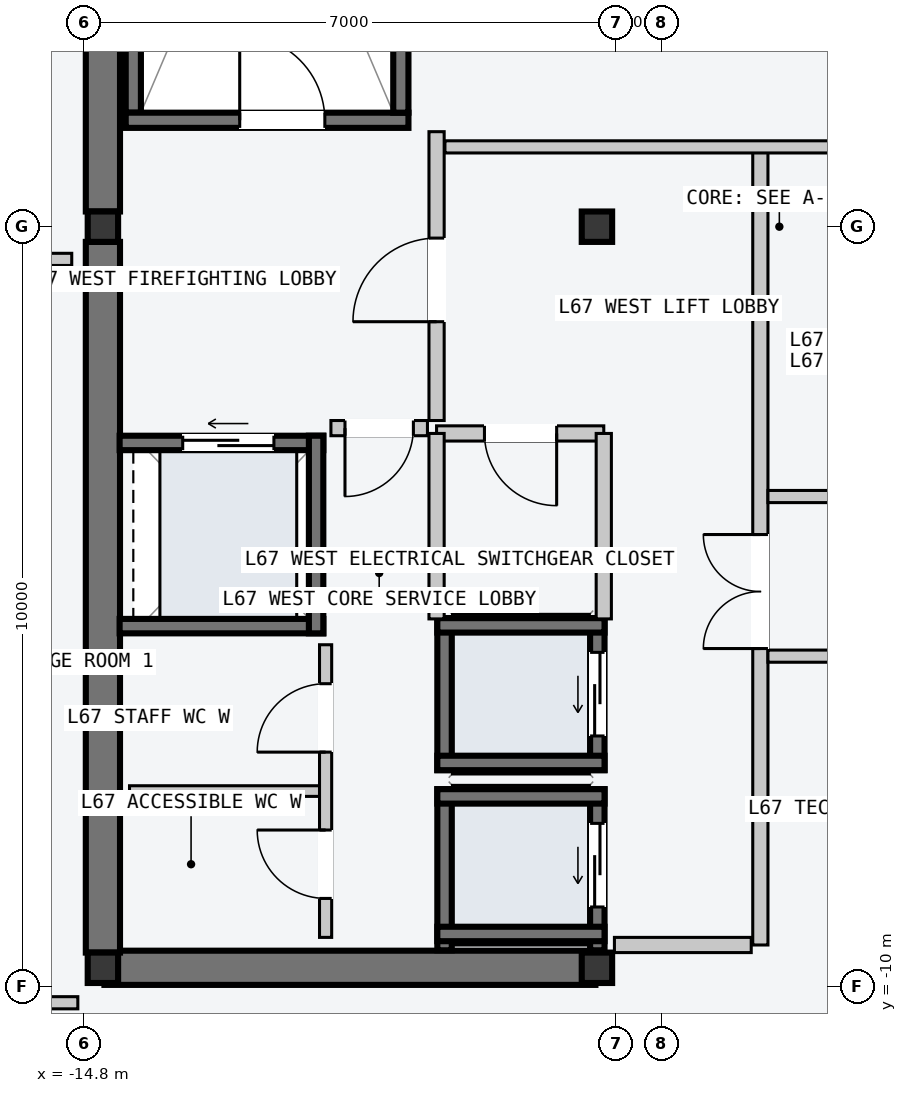
"""IFC4 building model, lengths in metres.
Left out: names, types, materials, properties, quantities, classifications, styles, units other than length and angle.
Written with IfcOpenShell. Run it as: python <this file> out.ifc"""

import sys

from ifc_helpers import new_model, si_unit, direction, frame, frame_2d, origin, origin_2d, place, context, subcontext, project, spatial, rectangle, i_section, extrude, element, fill, save


model = new_model("IFC4")
c1 = context("Model", 3, precision=1e-05, world=origin(), true_north=direction((0.0, 1.0)))
c2 = subcontext(c1, "Body", "Model", "MODEL_VIEW")
j1 = project(units=[si_unit("LENGTHUNIT", "METRE"), si_unit("PLANEANGLEUNIT", "RADIAN")], contexts=[c1])
p1 = place(None, origin())
s1 = spatial("IfcSite", under=j1, at=p1, CompositionType="ELEMENT")
p2 = place(p1, origin())
s2 = spatial("IfcBuilding", under=s1, at=p2, CompositionType="ELEMENT")
p3 = place(p2, frame((0.0, 0.0, 254.4)))
s3 = spatial("IfcBuildingStorey", under=s2, at=p3, CompositionType="ELEMENT", Elevation=254.4)
p4 = place(p3, frame((-14.53, -9.75, -0.2), z_axis=(0.0, 0.0, 1.0), x_axis=(1.0, 0.0, 0.0)))
e1 = element("IfcWall", 1, at=p4, inside=s3, PredefinedType="SHEAR", context=c2, shape_type="SweptSolid", body=[
    extrude(rectangle(XDim=6.46, YDim=0.45, at=frame_2d((3.23, 0.0))), origin(), (0.0, 0.0, 1.0), 3.6),
])
for number, where, z_axis, x_axis in (
    (2, (-14.55, -9.55, -0.2), (0.0, 0.0, 1.0), (0.0, 1.0, 0.0)),
    (3, (-14.55, 0.2, -0.2), (0.0, 0.0, 1.0), (0.0, 1.0, 0.0)),
):
    element("IfcWall", number, at=place(p3, frame(where, z_axis=z_axis, x_axis=x_axis)), inside=s3, PredefinedType="SHEAR", context=c2, shape_type="SweptSolid", body=[
        extrude(rectangle(XDim=9.35, YDim=0.45, at=frame_2d((4.675, 0.0))), origin(), (0.0, 0.0, 1.0), 3.6),
    ])
p5 = place(p3, frame((-14.15, 1.5, -0.2), z_axis=(0.0, 0.0, 1.0), x_axis=(0.0, 1.0, 0.0)))
e4 = element("IfcWall", 4, at=p5, inside=s3, PredefinedType="SOLIDWALL", context=c2, shape_type="SweptSolid", body=[
    extrude(rectangle(XDim=7.8, YDim=0.2, at=frame_2d((3.9, 0.0))), origin(), (0.0, 0.0, 1.0), 3.6),
])
p6 = place(p3, frame((-14.25, 1.4, -0.2), z_axis=(0.0, 0.0, 1.0), x_axis=(1.0, 0.0, 0.0)))
e5 = element("IfcWall", 5, at=p6, inside=s3, PredefinedType="SOLIDWALL", context=c2, shape_type="SweptSolid", body=[
    extrude(rectangle(XDim=3.72, YDim=0.2, at=frame_2d((1.86, 0.0))), origin(), (0.0, 0.0, 1.0), 3.6),
])
p7 = place(p6, frame((1.5, 0.0, 0.2)))
e6 = element("IfcOpeningElement", 6, at=p7, cuts=e5, PredefinedType="OPENING", context=c2, shape_type="SweptSolid", body=[
    extrude(rectangle(XDim=1.12, YDim=2.18, at=frame_2d((0.56, 1.09))), frame((0.0, 0.11, 0.0), z_axis=(0.0, -1.0, 0.0), x_axis=(1.0, 0.0, 0.0)), (0.0, 0.0, 1.0), 0.22),
])
p8 = place(p3, frame((-10.63, 1.5, -0.2), z_axis=(0.0, 0.0, 1.0), x_axis=(0.0, 1.0, 0.0)))
e7 = element("IfcWall", 7, at=p8, inside=s3, PredefinedType="SOLIDWALL", context=c2, shape_type="SweptSolid", body=[
    extrude(rectangle(XDim=7.8, YDim=0.2, at=frame_2d((3.9, 0.0))), origin(), (0.0, 0.0, 1.0), 3.6),
])
for number, where, z_axis, x_axis in (
    (8, (-14.55, -9.75, 0.0), (0.0, 0.0, 1.0), (1.0, 0.0, 0.0)),
    (9, (-14.55, 0.0, 0.0), (0.0, 0.0, 1.0), (1.0, 0.0, 0.0)),
    (10, (-8.05, -9.75, 0.0), (0.0, 0.0, 1.0), (1.0, 0.0, 0.0)),
    (11, (-8.05, 0.0, 0.0), (0.0, 0.0, 1.0), (1.0, 0.0, 0.0)),
):
    element("IfcColumn", number, at=place(p3, frame(where, z_axis=z_axis, x_axis=x_axis)), inside=s3, PredefinedType="COLUMN", context=c2, shape_type="SweptSolid", body=[
        extrude(i_section(OverallWidth=0.4, OverallDepth=0.4, WebThickness=0.013, FlangeThickness=0.021, at=origin_2d()), origin(), (0.0, 0.0, 1.0), 3.6),
    ])
p9 = place(p3, frame((-8.045, -9.52, -0.2), z_axis=(0.0, 0.0, 1.0), x_axis=(0.0, 1.0, 0.0)))
e12 = element("IfcWall", 12, at=p9, inside=s3, PredefinedType="SOLIDWALL", context=c2, shape_type="SweptSolid", body=[
    extrude(rectangle(XDim=2.12, YDim=0.19, at=frame_2d((1.06, 0.0))), origin(), (0.0, 0.0, 1.0), 3.6),
])
p10 = place(p9, frame((0.57, 0.0, 0.2)))
e13 = element("IfcOpeningElement", 13, at=p10, cuts=e12, PredefinedType="OPENING", context=c2, shape_type="SweptSolid", body=[
    extrude(rectangle(XDim=1.1, YDim=2.2, at=frame_2d((0.55, 1.1))), frame((0.0, 0.105, 0.0), z_axis=(0.0, -1.0, 0.0), x_axis=(1.0, 0.0, 0.0)), (0.0, 0.0, 1.0), 0.21),
])
p11 = place(p3, frame((-10.055, -9.52, -0.2), z_axis=(0.0, 0.0, 1.0), x_axis=(0.0, 1.0, 0.0)))
e14 = element("IfcWall", 14, at=p11, inside=s3, PredefinedType="SOLIDWALL", context=c2, shape_type="SweptSolid", body=[
    extrude(rectangle(XDim=2.12, YDim=0.19, at=frame_2d((1.06, 0.0))), origin(), (0.0, 0.0, 1.0), 3.6),
])
for number, where, z_axis, x_axis in (
    (15, (-10.15, -7.495, -0.2), (0.0, 0.0, 1.0), (1.0, 0.0, 0.0)),
    (16, (-10.15, -9.305, -0.2), (0.0, 0.0, 1.0), (1.0, 0.0, 0.0)),
):
    element("IfcWall", number, at=place(p3, frame(where, z_axis=z_axis, x_axis=x_axis)), inside=s3, PredefinedType="SOLIDWALL", context=c2, shape_type="SweptSolid", body=[
        extrude(rectangle(XDim=2.2, YDim=0.19, at=frame_2d((1.1, 0.0))), origin(), (0.0, 0.0, 1.0), 3.6),
    ])
p12 = place(p3, frame((-8.045, -7.15, -0.2), z_axis=(0.0, 0.0, 1.0), x_axis=(0.0, 1.0, 0.0)))
e17 = element("IfcWall", 17, at=p12, inside=s3, PredefinedType="SOLIDWALL", context=c2, shape_type="SweptSolid", body=[
    extrude(rectangle(XDim=2.0, YDim=0.19, at=frame_2d((1.0, 0.0))), origin(), (0.0, 0.0, 1.0), 3.6),
])
p13 = place(p12, frame((0.45, 0.0, 0.2)))
e18 = element("IfcOpeningElement", 18, at=p13, cuts=e17, PredefinedType="OPENING", context=c2, shape_type="SweptSolid", body=[
    extrude(rectangle(XDim=1.1, YDim=2.2, at=frame_2d((0.55, 1.1))), frame((0.0, 0.105, 0.0), z_axis=(0.0, -1.0, 0.0), x_axis=(1.0, 0.0, 0.0)), (0.0, 0.0, 1.0), 0.21),
])
p14 = place(p3, frame((-10.055, -7.15, -0.2), z_axis=(0.0, 0.0, 1.0), x_axis=(0.0, 1.0, 0.0)))
e19 = element("IfcWall", 19, at=p14, inside=s3, PredefinedType="SOLIDWALL", context=c2, shape_type="SweptSolid", body=[
    extrude(rectangle(XDim=2.0, YDim=0.19, at=frame_2d((1.0, 0.0))), origin(), (0.0, 0.0, 1.0), 3.6),
])
for number, where, z_axis, x_axis in (
    (20, (-10.15, -5.245, -0.2), (0.0, 0.0, 1.0), (1.0, 0.0, 0.0)),
    (21, (-10.15, -7.055, -0.2), (0.0, 0.0, 1.0), (1.0, 0.0, 0.0)),
):
    element("IfcWall", number, at=place(p3, frame(where, z_axis=z_axis, x_axis=x_axis)), inside=s3, PredefinedType="SOLIDWALL", context=c2, shape_type="SweptSolid", body=[
        extrude(rectangle(XDim=2.2, YDim=0.19, at=frame_2d((1.1, 0.0))), origin(), (0.0, 0.0, 1.0), 3.6),
    ])
p15 = place(p3, frame((-14.33, -2.845, -0.2), z_axis=(0.0, 0.0, 1.0), x_axis=(1.0, 0.0, 0.0)))
e22 = element("IfcWall", 22, at=p15, inside=s3, PredefinedType="SOLIDWALL", context=c2, shape_type="SweptSolid", body=[
    extrude(rectangle(XDim=2.68, YDim=0.19, at=frame_2d((1.34, 0.0))), origin(), (0.0, 0.0, 1.0), 3.6),
])
p16 = place(p15, frame((0.83, 0.0, 0.2)))
e23 = element("IfcOpeningElement", 23, at=p16, cuts=e22, PredefinedType="OPENING", context=c2, shape_type="SweptSolid", body=[
    extrude(rectangle(XDim=1.2, YDim=2.2, at=frame_2d((0.6, 1.1))), frame((0.0, 0.105, 0.0), z_axis=(0.0, -1.0, 0.0), x_axis=(1.0, 0.0, 0.0)), (0.0, 0.0, 1.0), 0.21),
])
p17 = place(p3, frame((-14.33, -5.255, -0.2), z_axis=(0.0, 0.0, 1.0), x_axis=(1.0, 0.0, 0.0)))
e24 = element("IfcWall", 24, at=p17, inside=s3, PredefinedType="SOLIDWALL", context=c2, shape_type="SweptSolid", body=[
    extrude(rectangle(XDim=2.68, YDim=0.19, at=frame_2d((1.34, 0.0))), origin(), (0.0, 0.0, 1.0), 3.6),
])
p18 = place(p3, frame((-11.745, -5.35, -0.2), z_axis=(0.0, 0.0, 1.0), x_axis=(0.0, 1.0, 0.0)))
e25 = element("IfcWall", 25, at=p18, inside=s3, PredefinedType="SOLIDWALL", context=c2, shape_type="SweptSolid", body=[
    extrude(rectangle(XDim=2.6, YDim=0.19, at=frame_2d((1.3, 0.0))), origin(), (0.0, 0.0, 1.0), 3.6),
])
p19 = place(p3, frame((-5.9, -9.45, 0.0), z_axis=(0.0, 0.0, 1.0), x_axis=(0.0, 1.0, 0.0)))
e26 = element("IfcWall", 26, at=p19, inside=s3, PredefinedType="PARTITIONING", context=c2, shape_type="SweptSolid", body=[
    extrude(rectangle(XDim=10.5, YDim=0.2, at=frame_2d((5.25, 0.0))), origin(), (0.0, 0.0, 1.0), 3.4),
])
p20 = place(p19, frame((3.9, 0.0, 0.0)))
e27 = element("IfcOpeningElement", 27, at=p20, cuts=e26, PredefinedType="OPENING", context=c2, shape_type="SweptSolid", body=[
    extrude(rectangle(XDim=1.5, YDim=2.2, at=frame_2d((0.75, 1.1))), frame((0.0, 0.11, 0.0), z_axis=(0.0, -1.0, 0.0), x_axis=(1.0, 0.0, 0.0)), (0.0, 0.0, 1.0), 0.22),
])
p21 = place(p3, frame((-6.02, -9.45, 0.0), z_axis=(0.0, 0.0, 1.0), x_axis=(-1.0, 0.0, 0.0)))
e28 = element("IfcWall", 28, at=p21, inside=s3, PredefinedType="PARTITIONING", context=c2, shape_type="SweptSolid", body=[
    extrude(rectangle(XDim=1.8, YDim=0.2, at=frame_2d((0.9, 0.0))), origin(), (0.0, 0.0, 1.0), 3.4),
])
p22 = place(p3, frame((-10.16, -2.55, 0.0), z_axis=(0.0, 0.0, 1.0), x_axis=(0.0, 1.0, 0.0)))
e29 = element("IfcWall", 29, at=p22, inside=s3, PredefinedType="PARTITIONING", context=c2, shape_type="SweptSolid", body=[
    extrude(rectangle(XDim=3.8, YDim=0.2, at=frame_2d((1.9, 0.0))), origin(), (0.0, 0.0, 1.0), 3.4),
])
p23 = place(p22, frame((1.3, 0.0, 0.0)))
e30 = element("IfcOpeningElement", 30, at=p23, cuts=e29, PredefinedType="OPENING", context=c2, shape_type="SweptSolid", body=[
    extrude(rectangle(XDim=1.1, YDim=2.15, at=frame_2d((0.55, 1.075))), frame((0.0, 0.11, 0.0), z_axis=(0.0, -1.0, 0.0), x_axis=(1.0, 0.0, 0.0)), (0.0, 0.0, 1.0), 0.22),
])
p24 = place(p3, frame((-10.28, -2.65, 0.0), z_axis=(0.0, 0.0, 1.0), x_axis=(-1.0, 0.0, 0.0)))
e31 = element("IfcWall", 31, at=p24, inside=s3, PredefinedType="PARTITIONING", context=c2, shape_type="SweptSolid", body=[
    extrude(rectangle(XDim=1.27, YDim=0.2, at=frame_2d((0.635, 0.0))), origin(), (0.0, 0.0, 1.0), 3.4),
])
p25 = place(p24, frame((0.185, 0.0, 0.0)))
e32 = element("IfcOpeningElement", 32, at=p25, cuts=e31, PredefinedType="OPENING", context=c2, shape_type="SweptSolid", body=[
    extrude(rectangle(XDim=0.9, YDim=2.15, at=frame_2d((0.45, 1.075))), frame((0.0, 0.11, 0.0), z_axis=(0.0, -1.0, 0.0), x_axis=(1.0, 0.0, 0.0)), (0.0, 0.0, 1.0), 0.22),
])
p26 = place(p3, frame((-7.96, -2.72, 0.0), z_axis=(0.0, 0.0, 1.0), x_axis=(-1.0, 0.0, 0.0)))
e33 = element("IfcWall", 33, at=p26, inside=s3, PredefinedType="PARTITIONING", context=c2, shape_type="SweptSolid", body=[
    extrude(rectangle(XDim=2.2, YDim=0.2, at=frame_2d((1.1, 0.0))), origin(), (0.0, 0.0, 1.0), 3.4),
])
p27 = place(p26, frame((0.62, 0.0, 0.0)))
e34 = element("IfcOpeningElement", 34, at=p27, cuts=e33, PredefinedType="OPENING", context=c2, shape_type="SweptSolid", body=[
    extrude(rectangle(XDim=0.95, YDim=2.1, at=frame_2d((0.475, 1.05))), frame((0.0, 0.11, 0.0), z_axis=(0.0, -1.0, 0.0), x_axis=(1.0, 0.0, 0.0)), (0.0, 0.0, 1.0), 0.22),
])
for number, where, z_axis, x_axis in (
    (35, (-7.96, -5.16, 0.0), (0.0, 0.0, 1.0), (0.0, 1.0, 0.0)),
    (36, (-10.16, -5.16, 0.0), (0.0, 0.0, 1.0), (0.0, 1.0, 0.0)),
):
    element("IfcWall", number, at=place(p3, frame(where, z_axis=z_axis, x_axis=x_axis)), inside=s3, PredefinedType="PARTITIONING", context=c2, shape_type="SweptSolid", body=[
        extrude(rectangle(XDim=2.44, YDim=0.2, at=frame_2d((1.22, 0.0))), origin(), (0.0, 0.0, 1.0), 3.4),
    ])
p28 = place(p3, frame((-11.7, -7.425, 0.0), z_axis=(0.0, 0.0, 1.0), x_axis=(-1.0, 0.0, 0.0)))
e37 = element("IfcWall", 37, at=p28, inside=s3, PredefinedType="PARTITIONING", context=c2, shape_type="SweptSolid", body=[
    extrude(rectangle(XDim=2.5, YDim=0.14, at=frame_2d((1.25, 0.0))), origin(), (0.0, 0.0, 1.0), 3.4),
])
p29 = place(p3, frame((-11.62, -9.35, 0.0), z_axis=(0.0, 0.0, 1.0), x_axis=(0.0, 1.0, 0.0)))
e38 = element("IfcWall", 38, at=p29, inside=s3, PredefinedType="PARTITIONING", context=c2, shape_type="SweptSolid", body=[
    extrude(rectangle(XDim=3.85, YDim=0.16, at=frame_2d((1.925, 0.0))), origin(), (0.0, 0.0, 1.0), 3.4),
])
p30 = place(p29, frame((0.512, 0.0, 0.0)))
e39 = element("IfcOpeningElement", 39, at=p30, cuts=e38, PredefinedType="OPENING", context=c2, shape_type="SweptSolid", body=[
    extrude(rectangle(XDim=0.9, YDim=2.15, at=frame_2d((0.45, 1.075))), frame((0.0, 0.09, 0.0), z_axis=(0.0, -1.0, 0.0), x_axis=(1.0, 0.0, 0.0)), (0.0, 0.0, 1.0), 0.18),
])
p31 = place(p29, frame((2.438, 0.0, 0.0)))
e40 = element("IfcOpeningElement", 40, at=p31, cuts=e38, PredefinedType="OPENING", context=c2, shape_type="SweptSolid", body=[
    extrude(rectangle(XDim=0.9, YDim=2.15, at=frame_2d((0.45, 1.075))), frame((0.0, 0.09, 0.0), z_axis=(0.0, -1.0, 0.0), x_axis=(1.0, 0.0, 0.0)), (0.0, 0.0, 1.0), 0.18),
])
p32 = place(p3, frame((-10.05, 1.05, 0.0), z_axis=(0.0, 0.0, 1.0), x_axis=(1.0, 0.0, 0.0)))
e41 = element("IfcWall", 41, at=p32, inside=s3, PredefinedType="PARTITIONING", context=c2, shape_type="SweptSolid", body=[
    extrude(rectangle(XDim=8.79, YDim=0.16, at=frame_2d((4.395, 0.0))), origin(), (0.0, 0.0, 1.0), 3.4),
])
for number, where, z_axis, x_axis in (
    (42, (-5.8, -3.55, 0.0), (0.0, 0.0, 1.0), (1.0, 0.0, 0.0)),
    (43, (-5.8, -5.65, 0.0), (0.0, 0.0, 1.0), (1.0, 0.0, 0.0)),
):
    element("IfcWall", number, at=place(p3, frame(where, z_axis=z_axis, x_axis=x_axis)), inside=s3, PredefinedType="PARTITIONING", context=c2, shape_type="SweptSolid", body=[
        extrude(rectangle(XDim=4.54, YDim=0.16, at=frame_2d((2.27, 0.0))), origin(), (0.0, 0.0, 1.0), 3.4),
    ])
p33 = place(p3, frame((-17.55, -10.21, 0.0), z_axis=(0.0, 0.0, 1.0), x_axis=(1.0, 0.0, 0.0)))
e44 = element("IfcWall", 44, at=p33, inside=s3, PredefinedType="PARTITIONING", context=c2, shape_type="SweptSolid", body=[
    extrude(rectangle(XDim=2.67, YDim=0.16, at=frame_2d((1.335, 0.0))), origin(), (0.0, 0.0, 1.0), 3.4),
])
p34 = place(p33, frame((0.855, 0.0, 0.0)))
e45 = element("IfcOpeningElement", 45, at=p34, cuts=e44, PredefinedType="OPENING", context=c2, shape_type="SweptSolid", body=[
    extrude(rectangle(XDim=0.96, YDim=2.18, at=frame_2d((0.48, 1.09))), frame((0.0, 0.09, 0.0), z_axis=(0.0, -1.0, 0.0), x_axis=(1.0, 0.0, 0.0)), (0.0, 0.0, 1.0), 0.18),
])
p35 = place(p3, frame((-18.56, -0.43, 0.0), z_axis=(0.0, 0.0, 1.0), x_axis=(1.0, 0.0, 0.0)))
e46 = element("IfcWall", 46, at=p35, inside=s3, PredefinedType="PARTITIONING", context=c2, shape_type="SweptSolid", body=[
    extrude(rectangle(XDim=3.6, YDim=0.16, at=frame_2d((1.8, 0.0))), origin(), (0.0, 0.0, 1.0), 3.4),
])
p36 = place(p35, frame((0.9, 0.0, 0.0)))
e47 = element("IfcOpeningElement", 47, at=p36, cuts=e46, PredefinedType="OPENING", context=c2, shape_type="SweptSolid", body=[
    extrude(rectangle(XDim=0.96, YDim=2.18, at=frame_2d((0.48, 1.09))), frame((0.0, 0.09, 0.0), z_axis=(0.0, -1.0, 0.0), x_axis=(1.0, 0.0, 0.0)), (0.0, 0.0, 1.0), 0.18),
])
p37 = place(p7, origin())
e48 = element("IfcDoor", 48, at=p37, inside=s3, OperationType="SINGLE_SWING_LEFT", PredefinedType="DOOR", context=c2, shape_type="SweptSolid", body=[
    extrude(rectangle(XDim=1.12, YDim=2.18, at=frame_2d((0.56, 1.09))), frame((0.0, 0.025, 0.0), z_axis=(0.0, -1.0, 0.0), x_axis=(1.0, 0.0, 0.0)), (0.0, 0.0, 1.0), 0.05),
])
fill(e6, e48)
p38 = place(p10, origin())
e49 = element("IfcDoor", 49, at=p38, inside=s3, OperationType="SLIDING_TO_LEFT", PredefinedType="DOOR", context=c2, shape_type="SweptSolid", body=[
    extrude(rectangle(XDim=1.1, YDim=2.2, at=frame_2d((0.55, 1.1))), frame((0.0, 0.025, 0.0), z_axis=(0.0, -1.0, 0.0), x_axis=(1.0, 0.0, 0.0)), (0.0, 0.0, 1.0), 0.05),
])
fill(e13, e49)
p39 = place(p13, origin())
e50 = element("IfcDoor", 50, at=p39, inside=s3, OperationType="SLIDING_TO_LEFT", PredefinedType="DOOR", context=c2, shape_type="SweptSolid", body=[
    extrude(rectangle(XDim=1.1, YDim=2.2, at=frame_2d((0.55, 1.1))), frame((0.0, 0.025, 0.0), z_axis=(0.0, -1.0, 0.0), x_axis=(1.0, 0.0, 0.0)), (0.0, 0.0, 1.0), 0.05),
])
fill(e18, e50)
p40 = place(p16, origin())
e51 = element("IfcDoor", 51, at=p40, inside=s3, OperationType="SLIDING_TO_LEFT", PredefinedType="DOOR", context=c2, shape_type="SweptSolid", body=[
    extrude(rectangle(XDim=1.2, YDim=2.2, at=frame_2d((0.6, 1.1))), frame((0.0, 0.025, 0.0), z_axis=(0.0, -1.0, 0.0), x_axis=(1.0, 0.0, 0.0)), (0.0, 0.0, 1.0), 0.05),
])
fill(e23, e51)
p41 = place(p20, origin())
e52 = element("IfcDoor", 52, at=p41, inside=s3, OperationType="DOUBLE_DOOR_SINGLE_SWING", PredefinedType="DOOR", context=c2, shape_type="SweptSolid", body=[
    extrude(rectangle(XDim=1.5, YDim=2.2, at=frame_2d((0.75, 1.1))), frame((0.0, 0.025, 0.0), z_axis=(0.0, -1.0, 0.0), x_axis=(1.0, 0.0, 0.0)), (0.0, 0.0, 1.0), 0.05),
])
fill(e27, e52)
p42 = place(p23, origin())
e53 = element("IfcDoor", 53, at=p42, inside=s3, OperationType="SINGLE_SWING_LEFT", PredefinedType="DOOR", context=c2, shape_type="SweptSolid", body=[
    extrude(rectangle(XDim=1.1, YDim=2.15, at=frame_2d((0.55, 1.075))), frame((0.0, 0.025, 0.0), z_axis=(0.0, -1.0, 0.0), x_axis=(1.0, 0.0, 0.0)), (0.0, 0.0, 1.0), 0.05),
])
fill(e30, e53)
p43 = place(p25, origin())
e54 = element("IfcDoor", 54, at=p43, inside=s3, OperationType="SINGLE_SWING_RIGHT", PredefinedType="DOOR", context=c2, shape_type="SweptSolid", body=[
    extrude(rectangle(XDim=0.9, YDim=2.15, at=frame_2d((0.45, 1.075))), frame((0.0, 0.025, 0.0), z_axis=(0.0, -1.0, 0.0), x_axis=(1.0, 0.0, 0.0)), (0.0, 0.0, 1.0), 0.05),
])
fill(e32, e54)
p44 = place(p27, origin())
e55 = element("IfcDoor", 55, at=p44, inside=s3, OperationType="SINGLE_SWING_LEFT", PredefinedType="DOOR", context=c2, shape_type="SweptSolid", body=[
    extrude(rectangle(XDim=0.95, YDim=2.1, at=frame_2d((0.475, 1.05))), frame((0.0, 0.025, 0.0), z_axis=(0.0, -1.0, 0.0), x_axis=(1.0, 0.0, 0.0)), (0.0, 0.0, 1.0), 0.05),
])
fill(e34, e55)
p45 = place(p30, origin())
e56 = element("IfcDoor", 56, at=p45, inside=s3, OperationType="SINGLE_SWING_RIGHT", PredefinedType="DOOR", context=c2, shape_type="SweptSolid", body=[
    extrude(rectangle(XDim=0.9, YDim=2.15, at=frame_2d((0.45, 1.075))), frame((0.0, 0.025, 0.0), z_axis=(0.0, -1.0, 0.0), x_axis=(1.0, 0.0, 0.0)), (0.0, 0.0, 1.0), 0.05),
])
fill(e39, e56)
p46 = place(p31, origin())
e57 = element("IfcDoor", 57, at=p46, inside=s3, OperationType="SINGLE_SWING_LEFT", PredefinedType="DOOR", context=c2, shape_type="SweptSolid", body=[
    extrude(rectangle(XDim=0.9, YDim=2.15, at=frame_2d((0.45, 1.075))), frame((0.0, 0.025, 0.0), z_axis=(0.0, -1.0, 0.0), x_axis=(1.0, 0.0, 0.0)), (0.0, 0.0, 1.0), 0.05),
])
fill(e40, e57)
save(model, sys.argv[1])
